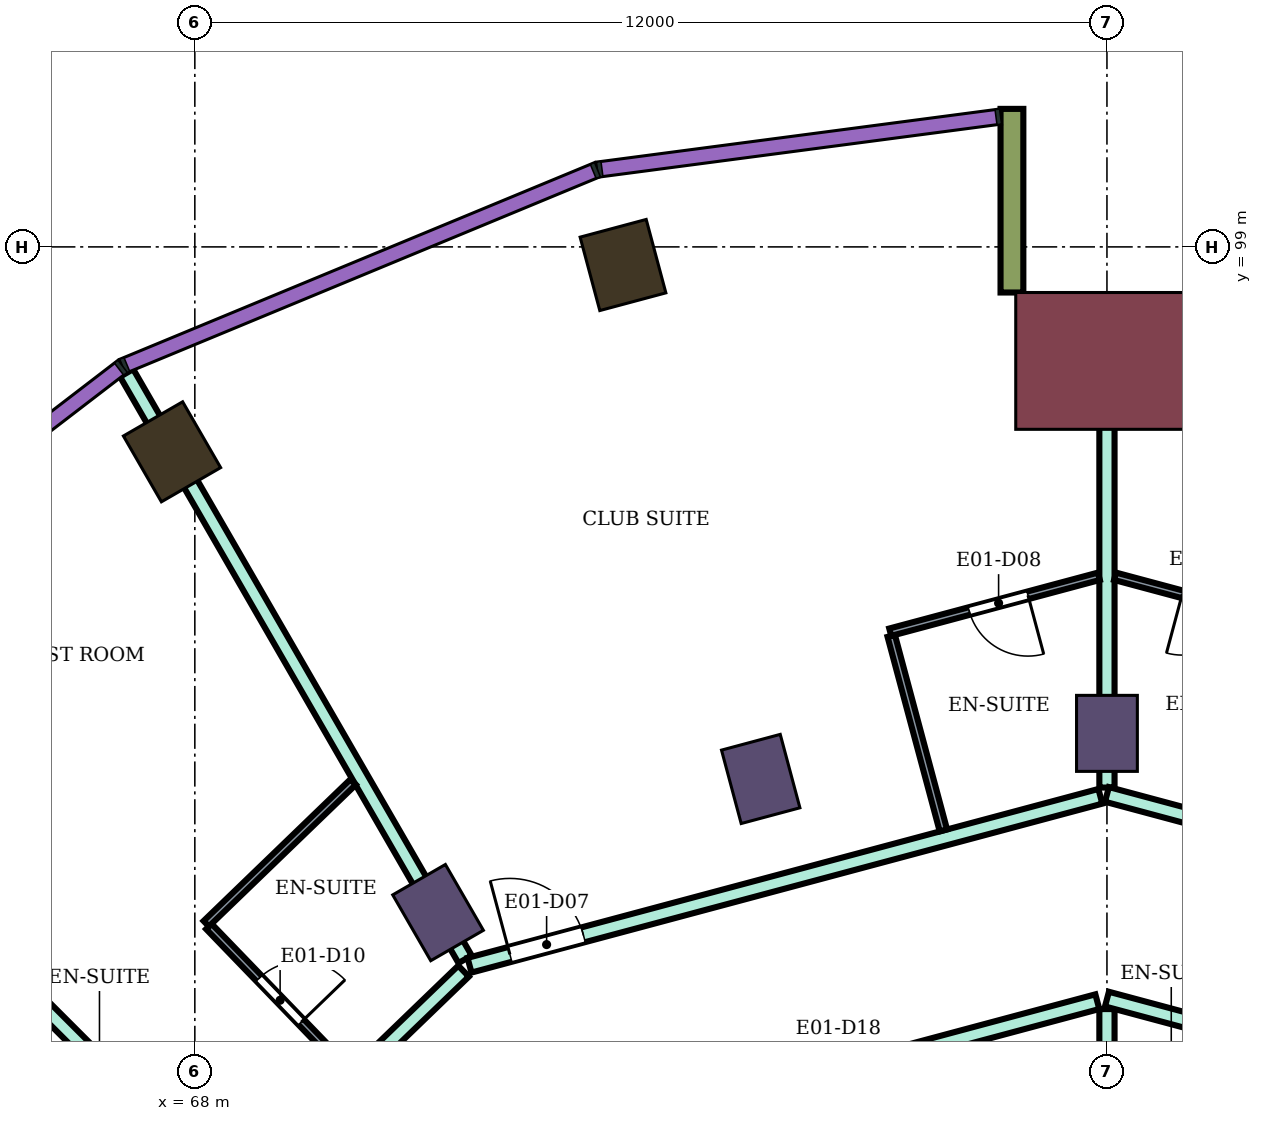
"""IFC4 building model, lengths in metres.
Left out: names, types, materials, properties, quantities, classifications, styles, units other than length and angle.
Written with IfcOpenShell. Run it as: python <this file> out.ifc"""

import sys

from ifc_helpers import new_model, si_unit, direction, frame, frame_2d, origin, origin_2d, place, context, subcontext, project, spatial, rectangle, extrude, element, fill, save


model = new_model("IFC4")
c1 = context("Model", 3, precision=1e-05, world=origin(), true_north=direction((0.0, 1.0)))
c2 = subcontext(c1, "Body", "Model", "MODEL_VIEW")
j1 = project(units=[si_unit("LENGTHUNIT", "METRE"), si_unit("PLANEANGLEUNIT", "RADIAN")], contexts=[c1])
p1 = place(None, origin())
s1 = spatial("IfcSite", under=j1, at=p1, CompositionType="ELEMENT")
p2 = place(p1, origin())
s2 = spatial("IfcBuilding", under=s1, at=p2, CompositionType="ELEMENT")
p3 = place(p2, frame((0.0, 0.0, 114.6)))
s3 = spatial("IfcBuildingStorey", under=s2, at=p3, CompositionType="ELEMENT", Elevation=114.6)
for number, where, z_axis, x_axis in (
    (1, (73.633, 98.762, 0.0), (0.0, 0.0, 1.0), (-0.259, 0.966, 0.0)),
    (2, (67.7, 96.304, 0.0), (0.0, 0.0, 1.0), (-0.5, 0.866, 0.0)),
):
    element("IfcColumn", number, at=place(p3, frame(where, z_axis=z_axis, x_axis=x_axis)), inside=s3, PredefinedType="COLUMN", context=c2, shape_type="SweptSolid", body=[
        extrude(rectangle(XDim=1.0, YDim=0.9, at=origin_2d()), origin(), (0.0, 0.0, 1.0), 3.9),
    ])
for number, where, z_axis, x_axis in (
    (3, (80.0, 92.6, 0.0), (0.0, 0.0, 1.0), (0.0, 1.0, 0.0)),
    (4, (75.445, 92.0, 0.0), (0.0, 0.0, 1.0), (-0.259, 0.966, 0.0)),
    (5, (71.2, 90.242, 0.0), (0.0, 0.0, 1.0), (-0.5, 0.866, 0.0)),
):
    element("IfcColumn", number, at=place(p3, frame(where, z_axis=z_axis, x_axis=x_axis)), inside=s3, PredefinedType="COLUMN", context=c2, shape_type="SweptSolid", body=[
        extrude(rectangle(XDim=1.0, YDim=0.8, at=origin_2d()), origin(), (0.0, 0.0, 1.0), 3.9),
    ])
p4 = place(p3, frame((80.0, 97.5, 0.0), z_axis=(0.0, 0.0, 1.0), x_axis=(0.0, 1.0, 0.0)))
e6 = element("IfcColumn", 6, at=p4, inside=s3, PredefinedType="COLUMN", context=c2, shape_type="SweptSolid", body=[
    extrude(rectangle(XDim=1.8, YDim=2.4, at=origin_2d()), origin(), (0.0, 0.0, 1.0), 3.9),
])
p5 = place(p3, frame((78.75, 98.4, 0.0), z_axis=(0.0, 0.0, 1.0), x_axis=(0.0, 1.0, 0.0)))
e7 = element("IfcWall", 7, at=p5, inside=s3, PredefinedType="NOTDEFINED", context=c2, shape_type="SweptSolid", body=[
    extrude(rectangle(XDim=2.416, YDim=0.3, at=frame_2d((1.208, 0.0))), origin(), (0.0, 0.0, 1.0), 3.9),
])
p6 = place(p3, frame((63.598, 91.408, 0.0), z_axis=(0.0, 0.0, 1.0), x_axis=(0.706963264491, -0.707250268759, 0.0)))
e8 = element("IfcWall", 8, at=p6, inside=s3, PredefinedType="PARTITIONING", context=c2, shape_type="SweptSolid", body=[
    extrude(rectangle(XDim=6.805, YDim=0.2, at=frame_2d((3.403, 0.0))), origin(), (0.0, 0.0, 1.0), 3.45),
])
p7 = place(p3, frame((66.797, 84.9, 0.0), z_axis=(0.0, 0.0, 1.0), x_axis=(0.719692092412, 0.694293376116, 0.0)))
e9 = element("IfcWall", 9, at=p7, inside=s3, PredefinedType="PARTITIONING", context=c2, shape_type="SweptSolid", body=[
    extrude(rectangle(XDim=6.584, YDim=0.2, at=frame_2d((3.292, 0.0))), origin(), (0.0, 0.0, 1.0), 3.45),
])
p8 = place(p7, frame((2.866, 0.0, 0.0)))
e10 = element("IfcOpeningElement", 10, at=p8, cuts=e9, PredefinedType="OPENING", context=c2, shape_type="SweptSolid", body=[
    extrude(rectangle(XDim=1.0, YDim=2.1, at=frame_2d((0.5, 1.05))), frame((0.0, 0.11, 0.0), z_axis=(0.0, -1.0, 0.0), x_axis=(1.0, 0.0, 0.0)), (0.0, 0.0, 1.0), 0.22),
])
p9 = place(p3, frame((67.102, 97.342, 0.0), z_axis=(0.0, 0.0, 1.0), x_axis=(0.499927298089, -0.866067374183, 0.0)))
e11 = element("IfcWall", 11, at=p9, inside=s3, PredefinedType="PARTITIONING", context=c2, shape_type="SweptSolid", body=[
    extrude(rectangle(XDim=8.907, YDim=0.2, at=frame_2d((4.454, 0.0))), origin(), (0.0, 0.0, 1.0), 3.45),
])
p10 = place(p3, frame((71.614, 89.55, 0.0), z_axis=(0.0, 0.0, 1.0), x_axis=(0.965967958589, 0.258661753994, 0.0)))
e12 = element("IfcWall", 12, at=p10, inside=s3, PredefinedType="PARTITIONING", context=c2, shape_type="SweptSolid", body=[
    extrude(rectangle(XDim=8.592, YDim=0.2, at=frame_2d((4.296, 0.0))), origin(), (0.0, 0.0, 1.0), 3.45),
])
p11 = place(p10, frame((0.55, 0.0, 0.0)))
e13 = element("IfcOpeningElement", 13, at=p11, cuts=e12, PredefinedType="OPENING", context=c2, shape_type="SweptSolid", body=[
    extrude(rectangle(XDim=1.0, YDim=2.1, at=frame_2d((0.5, 1.05))), frame((0.0, 0.11, 0.0), z_axis=(0.0, -1.0, 0.0), x_axis=(1.0, 0.0, 0.0)), (0.0, 0.0, 1.0), 0.22),
])
p12 = place(p3, frame((72.936, 87.211, 0.0), z_axis=(0.0, 0.0, 1.0), x_axis=(0.965917703859, 0.258849356521, 0.0)))
e14 = element("IfcWall", 14, at=p12, inside=s3, PredefinedType="PARTITIONING", context=c2, shape_type="SweptSolid", body=[
    extrude(rectangle(XDim=7.182, YDim=0.2, at=frame_2d((3.591, 0.0))), origin(), (0.0, 0.0, 1.0), 3.45),
])
p13 = place(p12, frame((2.757, 0.0, 0.0)))
e15 = element("IfcOpeningElement", 15, at=p13, cuts=e14, PredefinedType="OPENING", context=c2, shape_type="SweptSolid", body=[
    extrude(rectangle(XDim=1.8, YDim=2.1, at=frame_2d((0.9, 1.05))), frame((0.0, 0.11, 0.0), z_axis=(0.0, -1.0, 0.0), x_axis=(1.0, 0.0, 0.0)), (0.0, 0.0, 1.0), 0.22),
])
p14 = place(p3, frame((80.0, 82.7, 0.0), z_axis=(0.0, 0.0, 1.0), x_axis=(0.0, 1.0, 0.0)))
e16 = element("IfcWall", 16, at=p14, inside=s3, PredefinedType="PARTITIONING", context=c2, shape_type="SweptSolid", body=[
    extrude(rectangle(XDim=6.273, YDim=0.2, at=frame_2d((3.136, 0.0))), origin(), (0.0, 0.0, 1.0), 3.45),
])
p15 = place(p3, frame((80.0, 89.104, 0.0), z_axis=(0.0, 0.0, 1.0), x_axis=(0.965856548257, -0.259077455964, 0.0)))
e17 = element("IfcWall", 17, at=p15, inside=s3, PredefinedType="PARTITIONING", context=c2, shape_type="SweptSolid", body=[
    extrude(rectangle(XDim=7.173, YDim=0.2, at=frame_2d((3.586, 0.0))), origin(), (0.0, 0.0, 1.0), 3.45),
])
p16 = place(p15, frame((5.763, 0.0, 0.0)))
e18 = element("IfcOpeningElement", 18, at=p16, cuts=e17, PredefinedType="OPENING", context=c2, shape_type="SweptSolid", body=[
    extrude(rectangle(XDim=1.0, YDim=2.1, at=frame_2d((0.5, 1.05))), frame((0.0, 0.11, 0.0), z_axis=(0.0, -1.0, 0.0), x_axis=(1.0, 0.0, 0.0)), (0.0, 0.0, 1.0), 0.22),
])
p17 = place(p3, frame((80.0, 91.887, 0.0), z_axis=(0.0, 0.0, 1.0), x_axis=(0.0, 1.0, 0.0)))
e19 = element("IfcWall", 19, at=p17, inside=s3, PredefinedType="PARTITIONING", context=c2, shape_type="SweptSolid", body=[
    extrude(rectangle(XDim=6.312, YDim=0.2, at=frame_2d((3.156, 0.0))), origin(), (0.0, 0.0, 1.0), 3.45),
])
p18 = place(p3, frame((80.0, 91.797, 0.0), z_axis=(0.0, 0.0, 1.0), x_axis=(0.965857042792, -0.259075612301, 0.0)))
e20 = element("IfcWall", 20, at=p18, inside=s3, PredefinedType="PARTITIONING", context=c2, shape_type="SweptSolid", body=[
    extrude(rectangle(XDim=8.602, YDim=0.2, at=frame_2d((4.301, 0.0))), origin(), (0.0, 0.0, 1.0), 3.45),
])
p19 = place(p18, frame((4.877, 0.0, 0.0)))
e21 = element("IfcOpeningElement", 21, at=p19, cuts=e20, PredefinedType="OPENING", context=c2, shape_type="SweptSolid", body=[
    extrude(rectangle(XDim=1.0, YDim=2.1, at=frame_2d((0.5, 1.05))), frame((0.0, 0.11, 0.0), z_axis=(0.0, -1.0, 0.0), x_axis=(1.0, 0.0, 0.0)), (0.0, 0.0, 1.0), 0.22),
])
p20 = place(p18, frame((2.817, 0.0, 0.0)))
e22 = element("IfcOpeningElement", 22, at=p20, cuts=e20, PredefinedType="OPENING", context=c2, shape_type="SweptSolid", body=[
    extrude(rectangle(XDim=1.0, YDim=2.1, at=frame_2d((0.5, 1.05))), frame((0.0, 0.11, 0.0), z_axis=(0.0, -1.0, 0.0), x_axis=(1.0, 0.0, 0.0)), (0.0, 0.0, 1.0), 0.22),
])
p21 = place(p3, frame((68.185, 90.06, 0.0), z_axis=(0.0, 0.0, 1.0), x_axis=(0.69446127412, -0.719530081892, 0.0)))
e23 = element("IfcWall", 23, at=p21, inside=s3, PredefinedType="PARTITIONING", context=c2, shape_type="SweptSolid", body=[
    extrude(rectangle(XDim=2.649, YDim=0.1, at=frame_2d((1.324, 0.0))), origin(), (0.0, 0.0, 1.0), 3.45),
])
p22 = place(p21, frame((0.95, 0.0, 0.0)))
e24 = element("IfcOpeningElement", 24, at=p22, cuts=e23, PredefinedType="OPENING", context=c2, shape_type="SweptSolid", body=[
    extrude(rectangle(XDim=0.8, YDim=2.1, at=frame_2d((0.4, 1.05))), frame((0.0, 0.06, 0.0), z_axis=(0.0, -1.0, 0.0), x_axis=(1.0, 0.0, 0.0)), (0.0, 0.0, 1.0), 0.12),
])
p23 = place(p3, frame((68.15, 90.096, 0.0), z_axis=(0.0, 0.0, 1.0), x_axis=(0.719667544954, 0.694318820672, 0.0)))
e25 = element("IfcWall", 25, at=p23, inside=s3, PredefinedType="PARTITIONING", context=c2, shape_type="SweptSolid", body=[
    extrude(rectangle(XDim=2.687, YDim=0.1, at=frame_2d((1.344, 0.0))), origin(), (0.0, 0.0, 1.0), 3.45),
])
p24 = place(p3, frame((77.162, 93.883, 0.0), z_axis=(0.0, 0.0, 1.0), x_axis=(0.258998589493, -0.965877699629, 0.0)))
e26 = element("IfcWall", 26, at=p24, inside=s3, PredefinedType="PARTITIONING", context=c2, shape_type="SweptSolid", body=[
    extrude(rectangle(XDim=2.65, YDim=0.1, at=frame_2d((1.325, 0.0))), origin(), (0.0, 0.0, 1.0), 3.45),
])
p25 = place(p3, frame((77.149, 93.931, 0.0), z_axis=(0.0, 0.0, 1.0), x_axis=(0.965916219953, 0.258854893776, 0.0)))
e27 = element("IfcWall", 27, at=p25, inside=s3, PredefinedType="PARTITIONING", context=c2, shape_type="SweptSolid", body=[
    extrude(rectangle(XDim=2.842, YDim=0.1, at=frame_2d((1.421, 0.0))), origin(), (0.0, 0.0, 1.0), 3.45),
])
p26 = place(p25, frame((1.076, 0.0, 0.0)))
e28 = element("IfcOpeningElement", 28, at=p26, cuts=e27, PredefinedType="OPENING", context=c2, shape_type="SweptSolid", body=[
    extrude(rectangle(XDim=0.8, YDim=2.1, at=frame_2d((0.4, 1.05))), frame((0.0, 0.06, 0.0), z_axis=(0.0, -1.0, 0.0), x_axis=(1.0, 0.0, 0.0)), (0.0, 0.0, 1.0), 0.12),
])
p27 = place(p3, frame((80.106, 94.667, 0.0), z_axis=(0.0, 0.0, 1.0), x_axis=(0.965904298007, -0.258899376382, 0.0)))
e29 = element("IfcWall", 29, at=p27, inside=s3, PredefinedType="PARTITIONING", context=c2, shape_type="SweptSolid", body=[
    extrude(rectangle(XDim=2.69, YDim=0.1, at=frame_2d((1.345, 0.0))), origin(), (0.0, 0.0, 1.0), 3.45),
])
p28 = place(p27, frame((0.915, 0.0, 0.0)))
e30 = element("IfcOpeningElement", 30, at=p28, cuts=e29, PredefinedType="OPENING", context=c2, shape_type="SweptSolid", body=[
    extrude(rectangle(XDim=0.8, YDim=2.1, at=frame_2d((0.4, 1.05))), frame((0.0, 0.06, 0.0), z_axis=(0.0, -1.0, 0.0), x_axis=(1.0, 0.0, 0.0)), (0.0, 0.0, 1.0), 0.12),
])
p29 = place(p28, frame((0.8, 0.0, 0.0), z_axis=(0.0, 0.0, 1.0), x_axis=(-1.0, 0.0, 0.0)))
e31 = element("IfcDoor", 31, at=p29, inside=s3, OperationType="SINGLE_SWING_RIGHT", PredefinedType="DOOR", context=c2, shape_type="SweptSolid", body=[
    extrude(rectangle(XDim=0.8, YDim=2.1, at=frame_2d((0.4, 1.05))), frame((0.0, 0.025, 0.0), z_axis=(0.0, -1.0, 0.0), x_axis=(1.0, 0.0, 0.0)), (0.0, 0.0, 1.0), 0.05),
])
fill(e30, e31)
p30 = place(p11, origin())
e32 = element("IfcDoor", 32, at=p30, inside=s3, OperationType="SINGLE_SWING_LEFT", PredefinedType="DOOR", context=c2, shape_type="SweptSolid", body=[
    extrude(rectangle(XDim=1.0, YDim=2.1, at=frame_2d((0.5, 1.05))), frame((0.0, 0.025, 0.0), z_axis=(0.0, -1.0, 0.0), x_axis=(1.0, 0.0, 0.0)), (0.0, 0.0, 1.0), 0.05),
])
fill(e13, e32)
p31 = place(p26, frame((0.8, 0.0, 0.0), z_axis=(0.0, 0.0, 1.0), x_axis=(-1.0, 0.0, 0.0)))
e33 = element("IfcDoor", 33, at=p31, inside=s3, OperationType="SINGLE_SWING_LEFT", PredefinedType="DOOR", context=c2, shape_type="SweptSolid", body=[
    extrude(rectangle(XDim=0.8, YDim=2.1, at=frame_2d((0.4, 1.05))), frame((0.0, 0.025, 0.0), z_axis=(0.0, -1.0, 0.0), x_axis=(1.0, 0.0, 0.0)), (0.0, 0.0, 1.0), 0.05),
])
fill(e28, e33)
p32 = place(p22, origin())
e34 = element("IfcDoor", 34, at=p32, inside=s3, OperationType="SINGLE_SWING_RIGHT", PredefinedType="DOOR", context=c2, shape_type="SweptSolid", body=[
    extrude(rectangle(XDim=0.8, YDim=2.1, at=frame_2d((0.4, 1.05))), frame((0.0, 0.025, 0.0), z_axis=(0.0, -1.0, 0.0), x_axis=(1.0, 0.0, 0.0)), (0.0, 0.0, 1.0), 0.05),
])
fill(e24, e34)
save(model, sys.argv[1])
